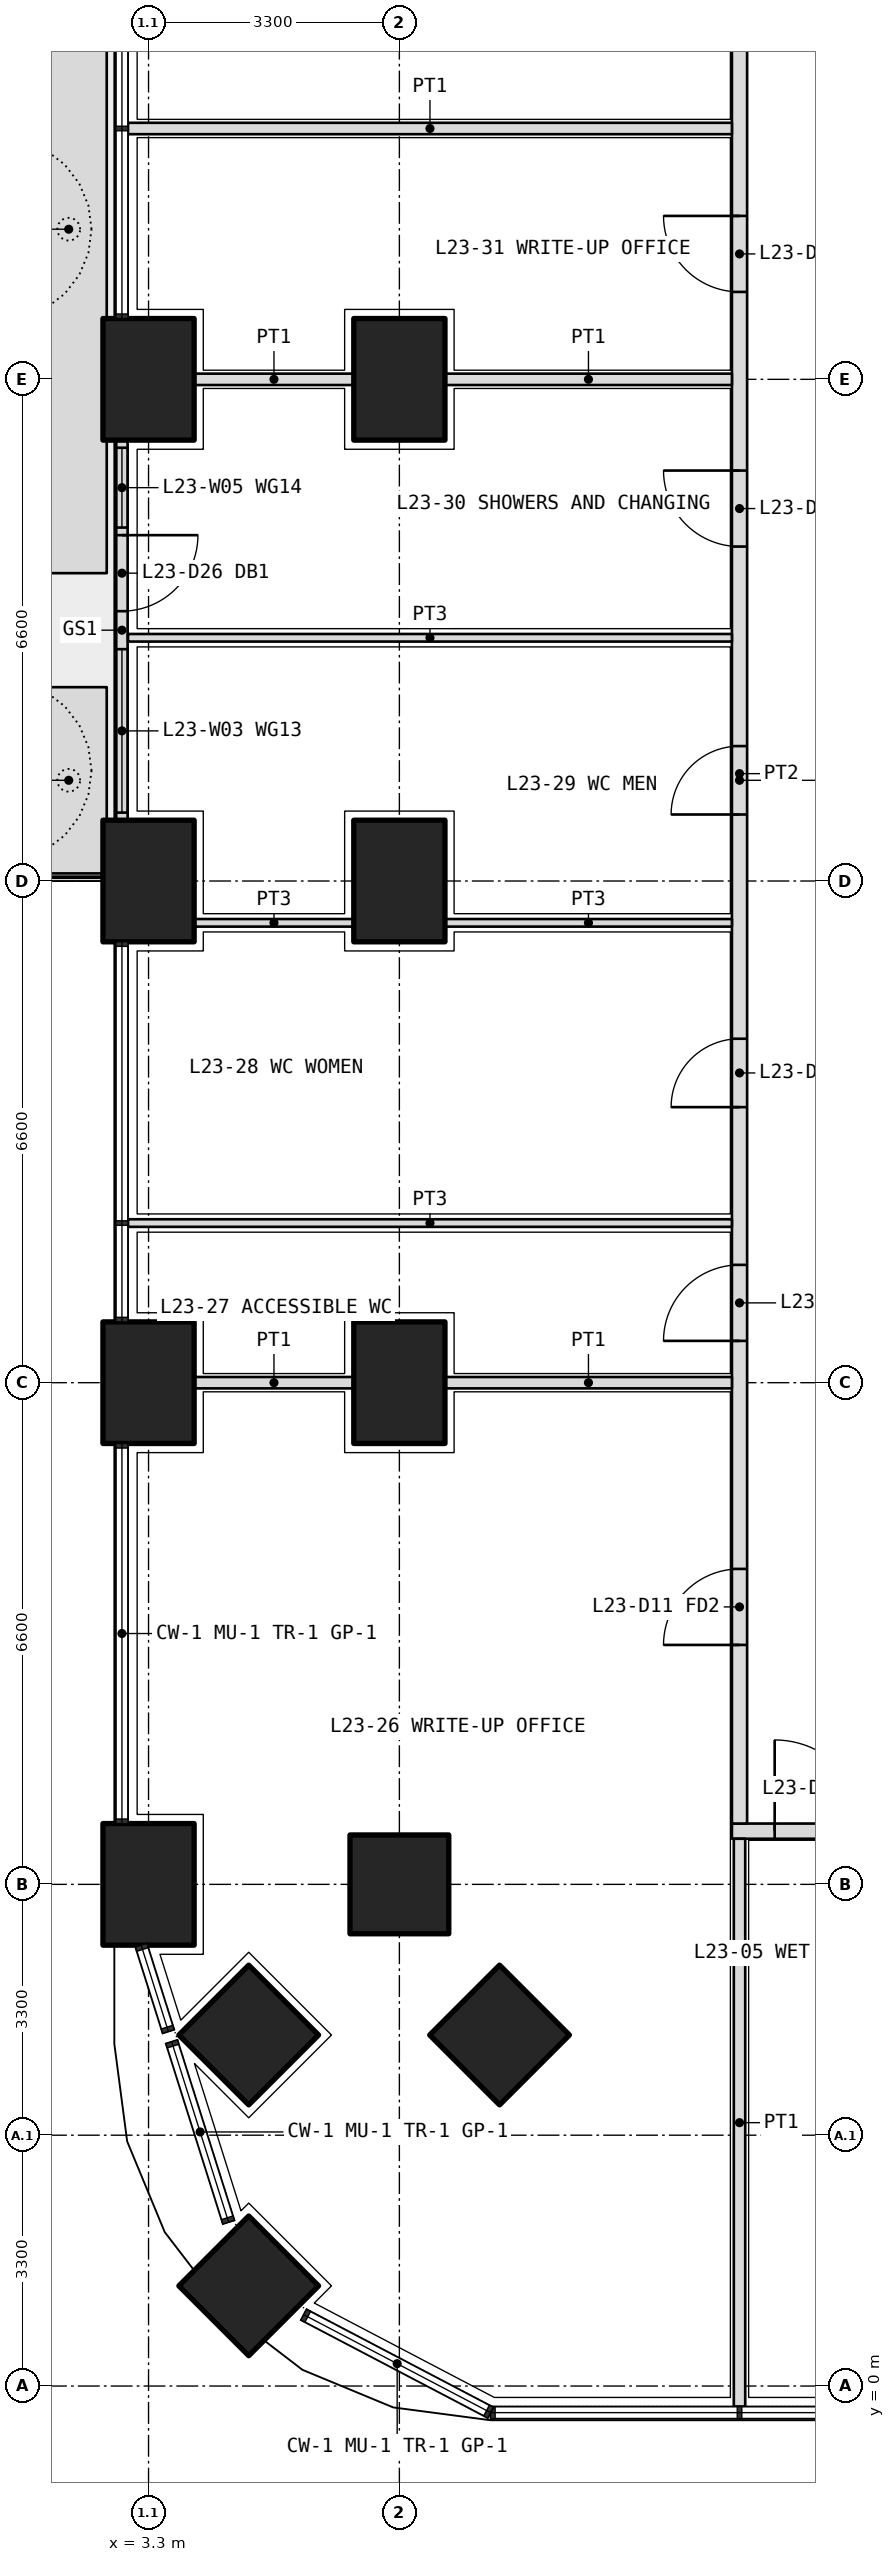
"""IFC4 building model, lengths in metres.
Left out: names, types, materials, properties, quantities, classifications, styles, units other than length and angle.
Written with IfcOpenShell. Run it as: python <this file> out.ifc"""

import sys

from ifc_helpers import new_model, si_unit, direction, frame, frame_2d, origin, origin_2d, place, context, subcontext, project, spatial, polyline, rectangle, outline, extrude, element, fill, save


model = new_model("IFC4")
c1 = context("Model", 3, precision=1e-05, world=origin(), true_north=direction((0.0, 1.0)))
c2 = subcontext(c1, "Body", "Model", "MODEL_VIEW")
j1 = project(units=[si_unit("LENGTHUNIT", "METRE"), si_unit("PLANEANGLEUNIT", "RADIAN")], contexts=[c1])
p1 = place(None, origin())
s1 = spatial("IfcSite", under=j1, at=p1, CompositionType="ELEMENT")
p2 = place(p1, origin())
s2 = spatial("IfcBuilding", under=s1, at=p2, CompositionType="ELEMENT")
p3 = place(p2, frame((0.0, 0.0, 103.2)))
s3 = spatial("IfcBuildingStorey", under=s2, at=p3, CompositionType="ELEMENT", Elevation=103.2)
p4 = place(p3, frame((4.618, 1.318, 0.0), z_axis=(0.0, 0.0, 1.0), x_axis=(0.707106781187, 0.707106781187, 0.0)))
e1 = element("IfcColumn", 1, at=p4, inside=s3, PredefinedType="COLUMN", context=c2, shape_type="SweptSolid", body=[
    extrude(rectangle(XDim=1.3, YDim=1.3, at=origin_2d()), origin(), (0.0, 0.0, 1.0), 4.2),
])
for number, where, z_axis, x_axis in (
    (2, (3.3, 6.6, 0.0), (0.0, 0.0, 1.0), (0.0, 1.0, 0.0)),
    (3, (3.3, 13.2, 0.0), (0.0, 0.0, 1.0), (0.0, 1.0, 0.0)),
    (4, (3.3, 19.8, 0.0), (0.0, 0.0, 1.0), (0.0, 1.0, 0.0)),
    (5, (3.3, 26.4, 0.0), (0.0, 0.0, 1.0), (0.0, 1.0, 0.0)),
):
    element("IfcColumn", number, at=place(p3, frame(where, z_axis=z_axis, x_axis=x_axis)), inside=s3, PredefinedType="COLUMN", context=c2, shape_type="SweptSolid", body=[
        extrude(rectangle(XDim=1.6, YDim=1.2, at=origin_2d()), origin(), (0.0, 0.0, 1.0), 4.2),
    ])
for number, where, z_axis, x_axis in (
    (6, (6.6, 6.6, 0.0), (0.0, 0.0, 1.0), (1.0, 0.0, 0.0)),
    (7, (4.618, 4.618, 0.0), (0.0, 0.0, 1.0), (0.707, 0.707, 0.0)),
    (8, (7.918, 4.618, 0.0), (0.0, 0.0, 1.0), (0.707, 0.707, 0.0)),
):
    element("IfcColumn", number, at=place(p3, frame(where, z_axis=z_axis, x_axis=x_axis)), inside=s3, PredefinedType="COLUMN", context=c2, shape_type="SweptSolid", body=[
        extrude(rectangle(XDim=1.3, YDim=1.3, at=origin_2d()), origin(), (0.0, 0.0, 1.0), 4.2),
    ])
for number, where, z_axis, x_axis in (
    (9, (6.6, 13.2, 0.0), (0.0, 0.0, 1.0), (0.0, 1.0, 0.0)),
    (10, (6.6, 19.8, 0.0), (0.0, 0.0, 1.0), (0.0, 1.0, 0.0)),
    (11, (6.6, 26.4, 0.0), (0.0, 0.0, 1.0), (0.0, 1.0, 0.0)),
):
    element("IfcColumn", number, at=place(p3, frame(where, z_axis=z_axis, x_axis=x_axis)), inside=s3, PredefinedType="COLUMN", context=c2, shape_type="SweptSolid", body=[
        extrude(rectangle(XDim=1.6, YDim=1.2, at=origin_2d()), origin(), (0.0, 0.0, 1.0), 4.2),
    ])
p5 = place(p3, origin())
e12 = element("IfcWall", 12, at=p5, inside=s3, PredefinedType="USERDEFINED", context=c2, shape_type="SweptSolid", body=[
    extrude(outline(polyline([(1.75, 19.9), (2.75, 19.9), (2.75, 22.35), (1.75, 22.35), (1.75, 19.9)]), holes=[polyline([(1.9, 20.05), (2.6, 20.05), (2.6, 22.2), (1.9, 22.2), (1.9, 20.05)])]), origin(), (0.0, 0.0, 1.0), 1.05),
])
p6 = place(p3, origin())
e13 = element("IfcWall", 13, at=p6, inside=s3, PredefinedType="USERDEFINED", context=c2, shape_type="SweptSolid", body=[
    extrude(outline(polyline([(1.75, 23.85), (2.75, 23.85), (2.75, 32.9), (1.75, 32.9), (1.75, 23.85)]), holes=[polyline([(1.9, 24.0), (2.6, 24.0), (2.6, 32.75), (1.9, 32.75), (1.9, 24.0)])]), origin(), (0.0, 0.0, 1.0), 1.05),
])
p7 = place(p3, frame((2.95, 25.6, 0.0), z_axis=(0.0, 0.0, 1.0), x_axis=(0.0, -1.0, 0.0)))
e14 = element("IfcWall", 14, at=p7, inside=s3, PredefinedType="SOLIDWALL", context=c2, shape_type="SweptSolid", body=[
    extrude(rectangle(XDim=5.0, YDim=0.15, at=frame_2d((2.5, 0.0))), origin(), (0.0, 0.0, 1.0), 2.7),
])
p8 = place(p7, frame((1.25, 0.0, 0.0)))
e15 = element("IfcOpeningElement", 15, at=p8, cuts=e14, PredefinedType="OPENING", context=c2, shape_type="SweptSolid", body=[
    extrude(rectangle(XDim=1.0, YDim=2.4, at=frame_2d((0.5, 1.2))), frame((0.0, 0.085, 0.0), z_axis=(0.0, -1.0, 0.0), x_axis=(1.0, 0.0, 0.0)), (0.0, 0.0, 1.0), 0.17),
])
p9 = place(p7, frame((0.1, 0.0, 0.1)))
e16 = element("IfcOpeningElement", 16, at=p9, cuts=e14, PredefinedType="OPENING", context=c2, shape_type="SweptSolid", body=[
    extrude(rectangle(XDim=1.05, YDim=2.3, at=frame_2d((0.525, 1.15))), frame((0.0, 0.085, 0.0), z_axis=(0.0, -1.0, 0.0), x_axis=(1.0, 0.0, 0.0)), (0.0, 0.0, 1.0), 0.17),
])
p10 = place(p7, frame((2.75, 0.0, 0.1)))
e17 = element("IfcOpeningElement", 17, at=p10, cuts=e14, PredefinedType="OPENING", context=c2, shape_type="SweptSolid", body=[
    extrude(rectangle(XDim=2.15, YDim=2.3, at=frame_2d((1.075, 1.15))), frame((0.0, 0.085, 0.0), z_axis=(0.0, -1.0, 0.0), x_axis=(1.0, 0.0, 0.0)), (0.0, 0.0, 1.0), 0.17),
])
p11 = place(p3, frame((10.975, 7.3, 0.0), z_axis=(0.0, 0.0, 1.0), x_axis=(1.0, 0.0, 0.0)))
e18 = element("IfcWall", 18, at=p11, inside=s3, PredefinedType="PARTITIONING", context=c2, shape_type="SweptSolid", body=[
    extrude(rectangle(XDim=30.85, YDim=0.2, at=frame_2d((15.425, 0.0))), origin(), (0.0, 0.0, 1.0), 2.85),
])
p12 = place(p11, frame((0.562, 0.0, 0.0)))
e19 = element("IfcOpeningElement", 19, at=p12, cuts=e18, PredefinedType="OPENING", context=c2, shape_type="SweptSolid", body=[
    extrude(rectangle(XDim=1.2, YDim=2.1, at=frame_2d((0.6, 1.05))), frame((0.0, 0.11, 0.0), z_axis=(0.0, -1.0, 0.0), x_axis=(1.0, 0.0, 0.0)), (0.0, 0.0, 1.0), 0.22),
])
p13 = place(p11, frame((8.325, 0.0, 0.0)))
e20 = element("IfcOpeningElement", 20, at=p13, cuts=e18, PredefinedType="OPENING", context=c2, shape_type="SweptSolid", body=[
    extrude(rectangle(XDim=1.0, YDim=2.1, at=frame_2d((0.5, 1.05))), frame((0.0, 0.11, 0.0), z_axis=(0.0, -1.0, 0.0), x_axis=(1.0, 0.0, 0.0)), (0.0, 0.0, 1.0), 0.22),
])
p14 = place(p11, frame((16.475, 0.0, 0.0)))
e21 = element("IfcOpeningElement", 21, at=p14, cuts=e18, PredefinedType="OPENING", context=c2, shape_type="SweptSolid", body=[
    extrude(rectangle(XDim=1.2, YDim=2.1, at=frame_2d((0.6, 1.05))), frame((0.0, 0.11, 0.0), z_axis=(0.0, -1.0, 0.0), x_axis=(1.0, 0.0, 0.0)), (0.0, 0.0, 1.0), 0.22),
])
p15 = place(p11, frame((21.525, 0.0, 0.0)))
e22 = element("IfcOpeningElement", 22, at=p15, cuts=e18, PredefinedType="OPENING", context=c2, shape_type="SweptSolid", body=[
    extrude(rectangle(XDim=1.0, YDim=2.1, at=frame_2d((0.5, 1.05))), frame((0.0, 0.11, 0.0), z_axis=(0.0, -1.0, 0.0), x_axis=(1.0, 0.0, 0.0)), (0.0, 0.0, 1.0), 0.22),
])
p16 = place(p11, frame((27.538, 0.0, 0.0)))
e23 = element("IfcOpeningElement", 23, at=p16, cuts=e18, PredefinedType="OPENING", context=c2, shape_type="SweptSolid", body=[
    extrude(rectangle(XDim=1.0, YDim=2.1, at=frame_2d((0.5, 1.05))), frame((0.0, 0.11, 0.0), z_axis=(0.0, -1.0, 0.0), x_axis=(1.0, 0.0, 0.0)), (0.0, 0.0, 1.0), 0.22),
])
p17 = place(p3, frame((11.075, 7.4, 0.0), z_axis=(0.0, 0.0, 1.0), x_axis=(0.0, 1.0, 0.0)))
e24 = element("IfcWall", 24, at=p17, inside=s3, PredefinedType="PARTITIONING", context=c2, shape_type="SweptSolid", body=[
    extrude(rectangle(XDim=27.625, YDim=0.2, at=frame_2d((13.812, 0.0))), origin(), (0.0, 0.0, 1.0), 2.85),
])
p18 = place(p17, frame((2.35, 0.0, 0.0)))
e25 = element("IfcOpeningElement", 25, at=p18, cuts=e24, PredefinedType="OPENING", context=c2, shape_type="SweptSolid", body=[
    extrude(rectangle(XDim=1.0, YDim=2.1, at=frame_2d((0.5, 1.05))), frame((0.0, 0.11, 0.0), z_axis=(0.0, -1.0, 0.0), x_axis=(1.0, 0.0, 0.0)), (0.0, 0.0, 1.0), 0.22),
])
p19 = place(p17, frame((6.35, 0.0, 0.0)))
e26 = element("IfcOpeningElement", 26, at=p19, cuts=e24, PredefinedType="OPENING", context=c2, shape_type="SweptSolid", body=[
    extrude(rectangle(XDim=1.0, YDim=2.1, at=frame_2d((0.5, 1.05))), frame((0.0, 0.11, 0.0), z_axis=(0.0, -1.0, 0.0), x_axis=(1.0, 0.0, 0.0)), (0.0, 0.0, 1.0), 0.22),
])
p20 = place(p17, frame((9.425, 0.0, 0.0)))
e27 = element("IfcOpeningElement", 27, at=p20, cuts=e24, PredefinedType="OPENING", context=c2, shape_type="SweptSolid", body=[
    extrude(rectangle(XDim=0.9, YDim=2.1, at=frame_2d((0.45, 1.05))), frame((0.0, 0.11, 0.0), z_axis=(0.0, -1.0, 0.0), x_axis=(1.0, 0.0, 0.0)), (0.0, 0.0, 1.0), 0.22),
])
p21 = place(p17, frame((13.275, 0.0, 0.0)))
e28 = element("IfcOpeningElement", 28, at=p21, cuts=e24, PredefinedType="OPENING", context=c2, shape_type="SweptSolid", body=[
    extrude(rectangle(XDim=0.9, YDim=2.1, at=frame_2d((0.45, 1.05))), frame((0.0, 0.11, 0.0), z_axis=(0.0, -1.0, 0.0), x_axis=(1.0, 0.0, 0.0)), (0.0, 0.0, 1.0), 0.22),
])
p22 = place(p17, frame((16.8, 0.0, 0.0)))
e29 = element("IfcOpeningElement", 29, at=p22, cuts=e24, PredefinedType="OPENING", context=c2, shape_type="SweptSolid", body=[
    extrude(rectangle(XDim=1.0, YDim=2.1, at=frame_2d((0.5, 1.05))), frame((0.0, 0.11, 0.0), z_axis=(0.0, -1.0, 0.0), x_axis=(1.0, 0.0, 0.0)), (0.0, 0.0, 1.0), 0.22),
])
p23 = place(p17, frame((20.15, 0.0, 0.0)))
e30 = element("IfcOpeningElement", 30, at=p23, cuts=e24, PredefinedType="OPENING", context=c2, shape_type="SweptSolid", body=[
    extrude(rectangle(XDim=1.0, YDim=2.1, at=frame_2d((0.5, 1.05))), frame((0.0, 0.11, 0.0), z_axis=(0.0, -1.0, 0.0), x_axis=(1.0, 0.0, 0.0)), (0.0, 0.0, 1.0), 0.22),
])
p24 = place(p17, frame((24.512, 0.0, 0.0)))
e31 = element("IfcOpeningElement", 31, at=p24, cuts=e24, PredefinedType="OPENING", context=c2, shape_type="SweptSolid", body=[
    extrude(rectangle(XDim=1.0, YDim=2.1, at=frame_2d((0.5, 1.05))), frame((0.0, 0.11, 0.0), z_axis=(0.0, -1.0, 0.0), x_axis=(1.0, 0.0, 0.0)), (0.0, 0.0, 1.0), 0.22),
])
p25 = place(p3, frame((11.075, -0.27, 0.0), z_axis=(0.0, 0.0, 1.0), x_axis=(0.0, 1.0, 0.0)))
e32 = element("IfcWall", 32, at=p25, inside=s3, PredefinedType="PARTITIONING", context=c2, shape_type="SweptSolid", body=[
    extrude(rectangle(XDim=7.47, YDim=0.15, at=frame_2d((3.735, 0.0))), origin(), (0.0, 0.0, 1.0), 2.7),
])
p26 = place(p3, frame((3.03, 15.3, 0.0), z_axis=(0.0, 0.0, 1.0), x_axis=(1.0, 0.0, 0.0)))
e33 = element("IfcWall", 33, at=p26, inside=s3, PredefinedType="PARTITIONING", context=c2, shape_type="SweptSolid", body=[
    extrude(rectangle(XDim=7.945, YDim=0.1, at=frame_2d((3.973, 0.0))), origin(), (0.0, 0.0, 1.0), 2.7),
])
p27 = place(p3, frame((3.9, 19.25, 0.0), z_axis=(0.0, 0.0, 1.0), x_axis=(1.0, 0.0, 0.0)))
e34 = element("IfcWall", 34, at=p27, inside=s3, PredefinedType="PARTITIONING", context=c2, shape_type="SweptSolid", body=[
    extrude(rectangle(XDim=2.1, YDim=0.1, at=frame_2d((1.05, 0.0))), origin(), (0.0, 0.0, 1.0), 2.85),
])
p28 = place(p3, frame((7.2, 19.25, 0.0), z_axis=(0.0, 0.0, 1.0), x_axis=(1.0, 0.0, 0.0)))
e35 = element("IfcWall", 35, at=p28, inside=s3, PredefinedType="PARTITIONING", context=c2, shape_type="SweptSolid", body=[
    extrude(rectangle(XDim=3.775, YDim=0.1, at=frame_2d((1.888, 0.0))), origin(), (0.0, 0.0, 1.0), 2.85),
])
p29 = place(p3, frame((3.03, 23.0, 0.0), z_axis=(0.0, 0.0, 1.0), x_axis=(1.0, 0.0, 0.0)))
e36 = element("IfcWall", 36, at=p29, inside=s3, PredefinedType="PARTITIONING", context=c2, shape_type="SweptSolid", body=[
    extrude(rectangle(XDim=7.945, YDim=0.1, at=frame_2d((3.973, 0.0))), origin(), (0.0, 0.0, 1.0), 2.7),
])
p30 = place(p3, frame((3.9, 13.2, 0.0), z_axis=(0.0, 0.0, 1.0), x_axis=(1.0, 0.0, 0.0)))
e37 = element("IfcWall", 37, at=p30, inside=s3, PredefinedType="PARTITIONING", context=c2, shape_type="SweptSolid", body=[
    extrude(rectangle(XDim=2.1, YDim=0.15, at=frame_2d((1.05, 0.0))), origin(), (0.0, 0.0, 1.0), 2.85),
])
p31 = place(p3, frame((7.2, 13.2, 0.0), z_axis=(0.0, 0.0, 1.0), x_axis=(1.0, 0.0, 0.0)))
e38 = element("IfcWall", 38, at=p31, inside=s3, PredefinedType="PARTITIONING", context=c2, shape_type="SweptSolid", body=[
    extrude(rectangle(XDim=3.775, YDim=0.15, at=frame_2d((1.888, 0.0))), origin(), (0.0, 0.0, 1.0), 2.85),
])
p32 = place(p3, frame((3.9, 26.4, 0.0), z_axis=(0.0, 0.0, 1.0), x_axis=(1.0, 0.0, 0.0)))
e39 = element("IfcWall", 39, at=p32, inside=s3, PredefinedType="PARTITIONING", context=c2, shape_type="SweptSolid", body=[
    extrude(rectangle(XDim=2.1, YDim=0.15, at=frame_2d((1.05, 0.0))), origin(), (0.0, 0.0, 1.0), 2.85),
])
p33 = place(p3, frame((7.2, 26.4, 0.0), z_axis=(0.0, 0.0, 1.0), x_axis=(1.0, 0.0, 0.0)))
e40 = element("IfcWall", 40, at=p33, inside=s3, PredefinedType="PARTITIONING", context=c2, shape_type="SweptSolid", body=[
    extrude(rectangle(XDim=3.775, YDim=0.15, at=frame_2d((1.888, 0.0))), origin(), (0.0, 0.0, 1.0), 2.85),
])
p34 = place(p3, frame((3.03, 29.7, 0.0), z_axis=(0.0, 0.0, 1.0), x_axis=(1.0, 0.0, 0.0)))
e41 = element("IfcWall", 41, at=p34, inside=s3, PredefinedType="PARTITIONING", context=c2, shape_type="SweptSolid", body=[
    extrude(rectangle(XDim=7.945, YDim=0.15, at=frame_2d((3.973, 0.0))), origin(), (0.0, 0.0, 1.0), 2.7),
])
p35 = place(p8, origin())
e42 = element("IfcDoor", 42, at=p35, inside=s3, OperationType="SINGLE_SWING_LEFT", PredefinedType="DOOR", context=c2, shape_type="SweptSolid", body=[
    extrude(rectangle(XDim=1.0, YDim=2.4, at=frame_2d((0.5, 1.2))), frame((0.0, 0.025, 0.0), z_axis=(0.0, -1.0, 0.0), x_axis=(1.0, 0.0, 0.0)), (0.0, 0.0, 1.0), 0.05),
])
fill(e15, e42)
p36 = place(p9, origin())
e43 = element("IfcWindow", 43, at=p36, inside=s3, PartitioningType="SINGLE_PANEL", PredefinedType="WINDOW", context=c2, shape_type="SweptSolid", body=[
    extrude(rectangle(XDim=1.05, YDim=2.3, at=frame_2d((0.525, 1.15))), frame((0.0, 0.03, 0.0), z_axis=(0.0, -1.0, 0.0), x_axis=(1.0, 0.0, 0.0)), (0.0, 0.0, 1.0), 0.06),
])
fill(e16, e43)
p37 = place(p10, origin())
e44 = element("IfcWindow", 44, at=p37, inside=s3, PartitioningType="SINGLE_PANEL", PredefinedType="WINDOW", context=c2, shape_type="SweptSolid", body=[
    extrude(rectangle(XDim=2.15, YDim=2.3, at=frame_2d((1.075, 1.15))), frame((0.0, 0.03, 0.0), z_axis=(0.0, -1.0, 0.0), x_axis=(1.0, 0.0, 0.0)), (0.0, 0.0, 1.0), 0.06),
])
fill(e17, e44)
p38 = place(p12, origin())
e45 = element("IfcDoor", 45, at=p38, inside=s3, OperationType="DOUBLE_DOOR_SINGLE_SWING", PredefinedType="DOOR", context=c2, shape_type="SweptSolid", body=[
    extrude(rectangle(XDim=1.2, YDim=2.1, at=frame_2d((0.6, 1.05))), frame((0.0, 0.025, 0.0), z_axis=(0.0, -1.0, 0.0), x_axis=(1.0, 0.0, 0.0)), (0.0, 0.0, 1.0), 0.05),
])
fill(e19, e45)
p39 = place(p18, origin())
e46 = element("IfcDoor", 46, at=p39, inside=s3, OperationType="SINGLE_SWING_LEFT", PredefinedType="DOOR", context=c2, shape_type="SweptSolid", body=[
    extrude(rectangle(XDim=1.0, YDim=2.1, at=frame_2d((0.5, 1.05))), frame((0.0, 0.025, 0.0), z_axis=(0.0, -1.0, 0.0), x_axis=(1.0, 0.0, 0.0)), (0.0, 0.0, 1.0), 0.05),
])
fill(e25, e46)
p40 = place(p19, origin())
e47 = element("IfcDoor", 47, at=p40, inside=s3, OperationType="SINGLE_SWING_LEFT", PredefinedType="DOOR", context=c2, shape_type="SweptSolid", body=[
    extrude(rectangle(XDim=1.0, YDim=2.1, at=frame_2d((0.5, 1.05))), frame((0.0, 0.025, 0.0), z_axis=(0.0, -1.0, 0.0), x_axis=(1.0, 0.0, 0.0)), (0.0, 0.0, 1.0), 0.05),
])
fill(e26, e47)
p41 = place(p20, origin())
e48 = element("IfcDoor", 48, at=p41, inside=s3, OperationType="SINGLE_SWING_LEFT", PredefinedType="DOOR", context=c2, shape_type="SweptSolid", body=[
    extrude(rectangle(XDim=0.9, YDim=2.1, at=frame_2d((0.45, 1.05))), frame((0.0, 0.025, 0.0), z_axis=(0.0, -1.0, 0.0), x_axis=(1.0, 0.0, 0.0)), (0.0, 0.0, 1.0), 0.05),
])
fill(e27, e48)
p42 = place(p21, origin())
e49 = element("IfcDoor", 49, at=p42, inside=s3, OperationType="SINGLE_SWING_LEFT", PredefinedType="DOOR", context=c2, shape_type="SweptSolid", body=[
    extrude(rectangle(XDim=0.9, YDim=2.1, at=frame_2d((0.45, 1.05))), frame((0.0, 0.025, 0.0), z_axis=(0.0, -1.0, 0.0), x_axis=(1.0, 0.0, 0.0)), (0.0, 0.0, 1.0), 0.05),
])
fill(e28, e49)
p43 = place(p22, origin())
e50 = element("IfcDoor", 50, at=p43, inside=s3, OperationType="SINGLE_SWING_RIGHT", PredefinedType="DOOR", context=c2, shape_type="SweptSolid", body=[
    extrude(rectangle(XDim=1.0, YDim=2.1, at=frame_2d((0.5, 1.05))), frame((0.0, 0.025, 0.0), z_axis=(0.0, -1.0, 0.0), x_axis=(1.0, 0.0, 0.0)), (0.0, 0.0, 1.0), 0.05),
])
fill(e29, e50)
p44 = place(p23, origin())
e51 = element("IfcDoor", 51, at=p44, inside=s3, OperationType="SINGLE_SWING_RIGHT", PredefinedType="DOOR", context=c2, shape_type="SweptSolid", body=[
    extrude(rectangle(XDim=1.0, YDim=2.1, at=frame_2d((0.5, 1.05))), frame((0.0, 0.025, 0.0), z_axis=(0.0, -1.0, 0.0), x_axis=(1.0, 0.0, 0.0)), (0.0, 0.0, 1.0), 0.05),
])
fill(e30, e51)
save(model, sys.argv[1])
